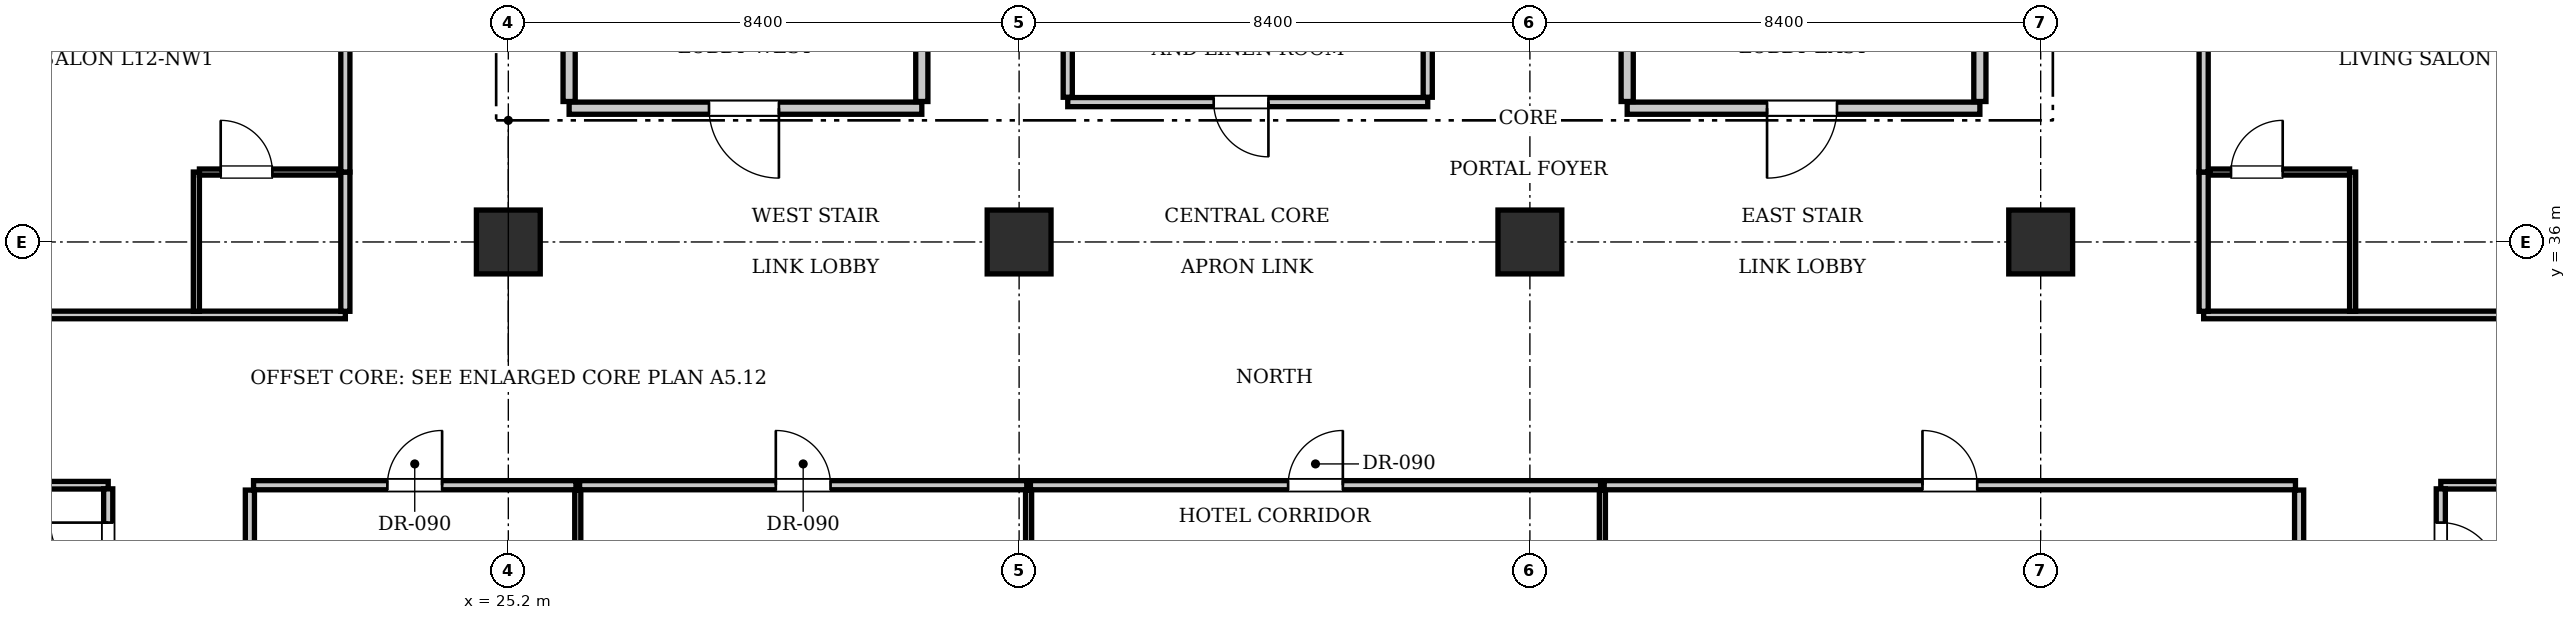
"""IFC4 building model, lengths in metres.
Left out: names, types, materials, properties, quantities, classifications, styles, units other than length and angle.
Written with IfcOpenShell. Run it as: python <this file> out.ifc"""

import sys

from ifc_helpers import new_model, si_unit, direction, frame, frame_2d, origin, origin_2d, place, context, subcontext, project, spatial, rectangle, extrude, element, fill, save


model = new_model("IFC4")
c1 = context("Model", 3, precision=1e-05, world=origin(), true_north=direction((0.0, 1.0)))
c2 = subcontext(c1, "Body", "Model", "MODEL_VIEW")
j1 = project(units=[si_unit("LENGTHUNIT", "METRE"), si_unit("PLANEANGLEUNIT", "RADIAN")], contexts=[c1])
p1 = place(None, origin())
s1 = spatial("IfcSite", under=j1, at=p1, CompositionType="ELEMENT")
p2 = place(p1, origin())
s2 = spatial("IfcBuilding", under=s1, at=p2, CompositionType="ELEMENT")
p3 = place(p2, frame((0.0, 0.0, 53.9)))
s3 = spatial("IfcBuildingStorey", under=s2, at=p3, CompositionType="ELEMENT", Elevation=53.9)
for number, where, z_axis, x_axis in (
    (1, (25.2, 36.0, 0.0), (0.0, 0.0, 1.0), (1.0, 0.0, 0.0)),
    (2, (33.6, 36.0, 0.0), (0.0, 0.0, 1.0), (1.0, 0.0, 0.0)),
    (3, (42.0, 36.0, 0.0), (0.0, 0.0, 1.0), (1.0, 0.0, 0.0)),
    (4, (50.4, 36.0, 0.0), (0.0, 0.0, 1.0), (1.0, 0.0, 0.0)),
):
    element("IfcColumn", number, at=place(p3, frame(where, z_axis=z_axis, x_axis=x_axis)), inside=s3, PredefinedType="COLUMN", context=c2, shape_type="SweptSolid", body=[
        extrude(rectangle(XDim=1.05, YDim=1.05, at=origin_2d()), origin(), (0.0, 0.0, 1.0), 3.85),
    ])
p4 = place(p3, frame((26.2, 38.2, 0.0), z_axis=(0.0, 0.0, 1.0), x_axis=(1.0, 0.0, 0.0)))
e5 = element("IfcWall", 5, at=p4, inside=s3, PredefinedType="PARTITIONING", context=c2, shape_type="SweptSolid", body=[
    extrude(rectangle(XDim=5.8, YDim=0.2, at=frame_2d((2.9, 0.0))), origin(), (0.0, 0.0, 1.0), 3.61),
])
p5 = place(p4, frame((2.3, 0.0, 0.0)))
e6 = element("IfcOpeningElement", 6, at=p5, cuts=e5, PredefinedType="OPENING", context=c2, shape_type="SweptSolid", body=[
    extrude(rectangle(XDim=1.15, YDim=2.15, at=frame_2d((0.575, 1.075))), frame((0.0, 0.11, 0.0), z_axis=(0.0, -1.0, 0.0), x_axis=(1.0, 0.0, 0.0)), (0.0, 0.0, 1.0), 0.22),
])
for number, where, z_axis, x_axis in (
    (7, (26.2, 38.31, 0.0), (0.0, 0.0, 1.0), (0.0, 1.0, 0.0)),
    (8, (32.0, 38.31, 0.0), (0.0, 0.0, 1.0), (0.0, 1.0, 0.0)),
):
    element("IfcWall", number, at=place(p3, frame(where, z_axis=z_axis, x_axis=x_axis)), inside=s3, PredefinedType="PARTITIONING", context=c2, shape_type="SweptSolid", body=[
        extrude(rectangle(XDim=3.07, YDim=0.2, at=frame_2d((1.535, 0.0))), origin(), (0.0, 0.0, 1.0), 3.61),
    ])
p6 = place(p3, frame((43.6, 38.2, 0.0), z_axis=(0.0, 0.0, 1.0), x_axis=(1.0, 0.0, 0.0)))
e9 = element("IfcWall", 9, at=p6, inside=s3, PredefinedType="PARTITIONING", context=c2, shape_type="SweptSolid", body=[
    extrude(rectangle(XDim=5.8, YDim=0.2, at=frame_2d((2.9, 0.0))), origin(), (0.0, 0.0, 1.0), 3.61),
])
p7 = place(p6, frame((2.3, 0.0, 0.0)))
e10 = element("IfcOpeningElement", 10, at=p7, cuts=e9, PredefinedType="OPENING", context=c2, shape_type="SweptSolid", body=[
    extrude(rectangle(XDim=1.15, YDim=2.15, at=frame_2d((0.575, 1.075))), frame((0.0, 0.11, 0.0), z_axis=(0.0, -1.0, 0.0), x_axis=(1.0, 0.0, 0.0)), (0.0, 0.0, 1.0), 0.22),
])
for number, where, z_axis, x_axis in (
    (11, (43.6, 38.31, 0.0), (0.0, 0.0, 1.0), (0.0, 1.0, 0.0)),
    (12, (49.4, 38.31, 0.0), (0.0, 0.0, 1.0), (0.0, 1.0, 0.0)),
):
    element("IfcWall", number, at=place(p3, frame(where, z_axis=z_axis, x_axis=x_axis)), inside=s3, PredefinedType="PARTITIONING", context=c2, shape_type="SweptSolid", body=[
        extrude(rectangle(XDim=3.07, YDim=0.2, at=frame_2d((1.535, 0.0))), origin(), (0.0, 0.0, 1.0), 3.61),
    ])
p8 = place(p3, frame((34.4, 38.3, 0.0), z_axis=(0.0, 0.0, 1.0), x_axis=(1.0, 0.0, 0.0)))
e13 = element("IfcWall", 13, at=p8, inside=s3, PredefinedType="PARTITIONING", context=c2, shape_type="SweptSolid", body=[
    extrude(rectangle(XDim=5.92, YDim=0.15, at=frame_2d((2.96, 0.0))), origin(), (0.0, 0.0, 1.0), 3.61),
])
p9 = place(p8, frame((2.4, 0.0, 0.0)))
e14 = element("IfcOpeningElement", 14, at=p9, cuts=e13, PredefinedType="OPENING", context=c2, shape_type="SweptSolid", body=[
    extrude(rectangle(XDim=0.9, YDim=2.1, at=frame_2d((0.45, 1.05))), frame((0.0, 0.085, 0.0), z_axis=(0.0, -1.0, 0.0), x_axis=(1.0, 0.0, 0.0)), (0.0, 0.0, 1.0), 0.17),
])
for number, where, z_axis, x_axis in (
    (15, (34.4, 38.38, 0.0), (0.0, 0.0, 1.0), (0.0, 1.0, 0.0)),
    (16, (40.32, 38.38, 0.0), (0.0, 0.0, 1.0), (0.0, 1.0, 0.0)),
):
    element("IfcWall", number, at=place(p3, frame(where, z_axis=z_axis, x_axis=x_axis)), inside=s3, PredefinedType="PARTITIONING", context=c2, shape_type="SweptSolid", body=[
        extrude(rectangle(XDim=2.84, YDim=0.15, at=frame_2d((1.42, 0.0))), origin(), (0.0, 0.0, 1.0), 3.61),
    ])
p10 = place(p3, frame((20.95, 23.98, 0.0), z_axis=(0.0, 0.0, 1.0), x_axis=(0.0, 1.0, 0.0)))
e17 = element("IfcWall", 17, at=p10, inside=s3, PredefinedType="PARTITIONING", context=c2, shape_type="SweptSolid", body=[
    extrude(rectangle(XDim=7.94, YDim=0.15, at=frame_2d((3.97, 0.0))), origin(), (0.0, 0.0, 1.0), 3.207),
])
p11 = place(p3, frame((54.65, 23.98, 0.0), z_axis=(0.0, 0.0, 1.0), x_axis=(0.0, 1.0, 0.0)))
e18 = element("IfcWall", 18, at=p11, inside=s3, PredefinedType="PARTITIONING", context=c2, shape_type="SweptSolid", body=[
    extrude(rectangle(XDim=7.94, YDim=0.15, at=frame_2d((3.97, 0.0))), origin(), (0.0, 0.0, 1.0), 3.255),
])
p12 = place(p3, frame((21.01, 32.0, 0.0), z_axis=(0.0, 0.0, 1.0), x_axis=(1.0, 0.0, 0.0)))
e19 = element("IfcWall", 19, at=p12, inside=s3, PredefinedType="PARTITIONING", context=c2, shape_type="SweptSolid", body=[
    extrude(rectangle(XDim=5.302, YDim=0.15, at=frame_2d((2.651, 0.0))), origin(), (0.0, 0.0, 1.0), 3.61),
])
p13 = place(p12, frame((2.201, 0.0, 0.0)))
e20 = element("IfcOpeningElement", 20, at=p13, cuts=e19, PredefinedType="OPENING", context=c2, shape_type="SweptSolid", body=[
    extrude(rectangle(XDim=0.9, YDim=2.1, at=frame_2d((0.45, 1.05))), frame((0.0, 0.085, 0.0), z_axis=(0.0, -1.0, 0.0), x_axis=(1.0, 0.0, 0.0)), (0.0, 0.0, 1.0), 0.17),
])
p14 = place(p3, frame((26.342, 23.98, 0.0), z_axis=(0.0, 0.0, 1.0), x_axis=(0.0, 1.0, 0.0)))
e21 = element("IfcWall", 21, at=p14, inside=s3, PredefinedType="PARTITIONING", context=c2, shape_type="SweptSolid", body=[
    extrude(rectangle(XDim=7.94, YDim=0.1, at=frame_2d((3.97, 0.0))), origin(), (0.0, 0.0, 1.0), 3.61),
])
p15 = place(p3, frame((26.372, 32.0, 0.0), z_axis=(0.0, 0.0, 1.0), x_axis=(1.0, 0.0, 0.0)))
e22 = element("IfcWall", 22, at=p15, inside=s3, PredefinedType="PARTITIONING", context=c2, shape_type="SweptSolid", body=[
    extrude(rectangle(XDim=7.354, YDim=0.15, at=frame_2d((3.677, 0.0))), origin(), (0.0, 0.0, 1.0), 3.61),
])
p16 = place(p15, frame((3.227, 0.0, 0.0)))
e23 = element("IfcOpeningElement", 23, at=p16, cuts=e22, PredefinedType="OPENING", context=c2, shape_type="SweptSolid", body=[
    extrude(rectangle(XDim=0.9, YDim=2.1, at=frame_2d((0.45, 1.05))), frame((0.0, 0.085, 0.0), z_axis=(0.0, -1.0, 0.0), x_axis=(1.0, 0.0, 0.0)), (0.0, 0.0, 1.0), 0.17),
])
p17 = place(p3, frame((33.756, 23.98, 0.0), z_axis=(0.0, 0.0, 1.0), x_axis=(0.0, 1.0, 0.0)))
e24 = element("IfcWall", 24, at=p17, inside=s3, PredefinedType="PARTITIONING", context=c2, shape_type="SweptSolid", body=[
    extrude(rectangle(XDim=7.94, YDim=0.1, at=frame_2d((3.97, 0.0))), origin(), (0.0, 0.0, 1.0), 2.988),
])
p18 = place(p3, frame((33.786, 32.0, 0.0), z_axis=(0.0, 0.0, 1.0), x_axis=(1.0, 0.0, 0.0)))
e25 = element("IfcWall", 25, at=p18, inside=s3, PredefinedType="PARTITIONING", context=c2, shape_type="SweptSolid", body=[
    extrude(rectangle(XDim=9.376, YDim=0.15, at=frame_2d((4.688, 0.0))), origin(), (0.0, 0.0, 1.0), 3.61),
])
p19 = place(p18, frame((4.238, 0.0, 0.0)))
e26 = element("IfcOpeningElement", 26, at=p19, cuts=e25, PredefinedType="OPENING", context=c2, shape_type="SweptSolid", body=[
    extrude(rectangle(XDim=0.9, YDim=2.1, at=frame_2d((0.45, 1.05))), frame((0.0, 0.085, 0.0), z_axis=(0.0, -1.0, 0.0), x_axis=(1.0, 0.0, 0.0)), (0.0, 0.0, 1.0), 0.17),
])
p20 = place(p3, frame((43.192, 23.98, 0.0), z_axis=(0.0, 0.0, 1.0), x_axis=(0.0, 1.0, 0.0)))
e27 = element("IfcWall", 27, at=p20, inside=s3, PredefinedType="PARTITIONING", context=c2, shape_type="SweptSolid", body=[
    extrude(rectangle(XDim=7.94, YDim=0.1, at=frame_2d((3.97, 0.0))), origin(), (0.0, 0.0, 1.0), 3.61),
])
p21 = place(p3, frame((43.222, 32.0, 0.0), z_axis=(0.0, 0.0, 1.0), x_axis=(1.0, 0.0, 0.0)))
e28 = element("IfcWall", 28, at=p21, inside=s3, PredefinedType="PARTITIONING", context=c2, shape_type="SweptSolid", body=[
    extrude(rectangle(XDim=11.368, YDim=0.15, at=frame_2d((5.684, 0.0))), origin(), (0.0, 0.0, 1.0), 3.61),
])
p22 = place(p21, frame((5.234, 0.0, 0.0)))
e29 = element("IfcOpeningElement", 29, at=p22, cuts=e28, PredefinedType="OPENING", context=c2, shape_type="SweptSolid", body=[
    extrude(rectangle(XDim=0.9, YDim=2.1, at=frame_2d((0.45, 1.05))), frame((0.0, 0.085, 0.0), z_axis=(0.0, -1.0, 0.0), x_axis=(1.0, 0.0, 0.0)), (0.0, 0.0, 1.0), 0.17),
])
p23 = place(p3, frame((10.9, 32.0, 0.0), z_axis=(0.0, 0.0, 1.0), x_axis=(1.0, 0.0, 0.0)))
e30 = element("IfcWall", 30, at=p23, inside=s3, PredefinedType="PARTITIONING", context=c2, shape_type="SweptSolid", body=[
    extrude(rectangle(XDim=7.72, YDim=0.125, at=frame_2d((3.86, 0.0))), origin(), (0.0, 0.0, 1.0), 3.61),
])
p24 = place(p3, frame((56.98, 32.0, 0.0), z_axis=(0.0, 0.0, 1.0), x_axis=(1.0, 0.0, 0.0)))
e31 = element("IfcWall", 31, at=p24, inside=s3, PredefinedType="PARTITIONING", context=c2, shape_type="SweptSolid", body=[
    extrude(rectangle(XDim=7.72, YDim=0.125, at=frame_2d((3.86, 0.0))), origin(), (0.0, 0.0, 1.0), 3.61),
])
p25 = place(p3, frame((18.62, 29.88, 0.0), z_axis=(0.0, 0.0, 1.0), x_axis=(0.0, 1.0, 0.0)))
e32 = element("IfcWall", 32, at=p25, inside=s3, PredefinedType="PARTITIONING", context=c2, shape_type="SweptSolid", body=[
    extrude(rectangle(XDim=2.06, YDim=0.15, at=frame_2d((1.03, 0.0))), origin(), (0.0, 0.0, 1.0), 3.61),
])
p26 = place(p25, frame((0.555, 0.0, 0.0)))
e33 = element("IfcOpeningElement", 33, at=p26, cuts=e32, PredefinedType="OPENING", context=c2, shape_type="SweptSolid", body=[
    extrude(rectangle(XDim=0.95, YDim=2.15, at=frame_2d((0.475, 1.075))), frame((0.0, 0.085, 0.0), z_axis=(0.0, -1.0, 0.0), x_axis=(1.0, 0.0, 0.0)), (0.0, 0.0, 1.0), 0.17),
])
p27 = place(p3, frame((56.98, 29.88, 0.0), z_axis=(0.0, 0.0, 1.0), x_axis=(0.0, 1.0, 0.0)))
e34 = element("IfcWall", 34, at=p27, inside=s3, PredefinedType="PARTITIONING", context=c2, shape_type="SweptSolid", body=[
    extrude(rectangle(XDim=2.06, YDim=0.15, at=frame_2d((1.03, 0.0))), origin(), (0.0, 0.0, 1.0), 3.61),
])
p28 = place(p27, frame((0.555, 0.0, 0.0)))
e35 = element("IfcOpeningElement", 35, at=p28, cuts=e34, PredefinedType="OPENING", context=c2, shape_type="SweptSolid", body=[
    extrude(rectangle(XDim=0.95, YDim=2.15, at=frame_2d((0.475, 1.075))), frame((0.0, 0.085, 0.0), z_axis=(0.0, -1.0, 0.0), x_axis=(1.0, 0.0, 0.0)), (0.0, 0.0, 1.0), 0.17),
])
p29 = place(p3, frame((10.9, 34.8, 0.0), z_axis=(0.0, 0.0, 1.0), x_axis=(1.0, 0.0, 0.0)))
e36 = element("IfcWall", 36, at=p29, inside=s3, PredefinedType="PARTITIONING", context=c2, shape_type="SweptSolid", body=[
    extrude(rectangle(XDim=11.62, YDim=0.125, at=frame_2d((5.81, 0.0))), origin(), (0.0, 0.0, 1.0), 3.61),
])
p30 = place(p3, frame((53.08, 34.8, 0.0), z_axis=(0.0, 0.0, 1.0), x_axis=(1.0, 0.0, 0.0)))
e37 = element("IfcWall", 37, at=p30, inside=s3, PredefinedType="PARTITIONING", context=c2, shape_type="SweptSolid", body=[
    extrude(rectangle(XDim=11.62, YDim=0.125, at=frame_2d((5.81, 0.0))), origin(), (0.0, 0.0, 1.0), 3.61),
])
p31 = place(p3, frame((22.52, 34.86, 0.0), z_axis=(0.0, 0.0, 1.0), x_axis=(0.0, 1.0, 0.0)))
e38 = element("IfcWall", 38, at=p31, inside=s3, PredefinedType="PARTITIONING", context=c2, shape_type="SweptSolid", body=[
    extrude(rectangle(XDim=2.29, YDim=0.15, at=frame_2d((1.145, 0.0))), origin(), (0.0, 0.0, 1.0), 3.61),
])
p32 = place(p3, frame((22.52, 37.15, 0.0), z_axis=(0.0, 0.0, 1.0), x_axis=(0.0, 1.0, 0.0)))
e39 = element("IfcWall", 39, at=p32, inside=s3, PredefinedType="PARTITIONING", context=c2, shape_type="SweptSolid", body=[
    extrude(rectangle(XDim=5.359, YDim=0.15, at=frame_2d((2.679, 0.0))), origin(), (0.0, 0.0, 1.0), 3.61),
])
p33 = place(p32, frame((2.204, 0.0, 0.0)))
e40 = element("IfcOpeningElement", 40, at=p33, cuts=e39, PredefinedType="OPENING", context=c2, shape_type="SweptSolid", body=[
    extrude(rectangle(XDim=0.95, YDim=2.15, at=frame_2d((0.475, 1.075))), frame((0.0, 0.085, 0.0), z_axis=(0.0, -1.0, 0.0), x_axis=(1.0, 0.0, 0.0)), (0.0, 0.0, 1.0), 0.17),
])
p34 = place(p3, frame((20.07, 34.86, 0.0), z_axis=(0.0, 0.0, 1.0), x_axis=(0.0, 1.0, 0.0)))
e41 = element("IfcWall", 41, at=p34, inside=s3, PredefinedType="PARTITIONING", context=c2, shape_type="SweptSolid", body=[
    extrude(rectangle(XDim=2.29, YDim=0.1, at=frame_2d((1.145, 0.0))), origin(), (0.0, 0.0, 1.0), 3.61),
])
p35 = place(p3, frame((20.12, 37.15, 0.0), z_axis=(0.0, 0.0, 1.0), x_axis=(1.0, 0.0, 0.0)))
e42 = element("IfcWall", 42, at=p35, inside=s3, PredefinedType="PARTITIONING", context=c2, shape_type="SweptSolid", body=[
    extrude(rectangle(XDim=2.3, YDim=0.1, at=frame_2d((1.15, 0.0))), origin(), (0.0, 0.0, 1.0), 3.61),
])
p36 = place(p35, frame((0.35, 0.0, 0.0)))
e43 = element("IfcOpeningElement", 43, at=p36, cuts=e42, PredefinedType="OPENING", context=c2, shape_type="SweptSolid", body=[
    extrude(rectangle(XDim=0.85, YDim=2.1, at=frame_2d((0.425, 1.05))), frame((0.0, 0.06, 0.0), z_axis=(0.0, -1.0, 0.0), x_axis=(1.0, 0.0, 0.0)), (0.0, 0.0, 1.0), 0.12),
])
p37 = place(p3, frame((53.08, 34.86, 0.0), z_axis=(0.0, 0.0, 1.0), x_axis=(0.0, 1.0, 0.0)))
e44 = element("IfcWall", 44, at=p37, inside=s3, PredefinedType="PARTITIONING", context=c2, shape_type="SweptSolid", body=[
    extrude(rectangle(XDim=2.29, YDim=0.15, at=frame_2d((1.145, 0.0))), origin(), (0.0, 0.0, 1.0), 3.61),
])
p38 = place(p3, frame((53.08, 37.15, 0.0), z_axis=(0.0, 0.0, 1.0), x_axis=(0.0, 1.0, 0.0)))
e45 = element("IfcWall", 45, at=p38, inside=s3, PredefinedType="PARTITIONING", context=c2, shape_type="SweptSolid", body=[
    extrude(rectangle(XDim=5.359, YDim=0.15, at=frame_2d((2.679, 0.0))), origin(), (0.0, 0.0, 1.0), 3.61),
])
p39 = place(p38, frame((2.204, 0.0, 0.0)))
e46 = element("IfcOpeningElement", 46, at=p39, cuts=e45, PredefinedType="OPENING", context=c2, shape_type="SweptSolid", body=[
    extrude(rectangle(XDim=0.95, YDim=2.15, at=frame_2d((0.475, 1.075))), frame((0.0, 0.085, 0.0), z_axis=(0.0, -1.0, 0.0), x_axis=(1.0, 0.0, 0.0)), (0.0, 0.0, 1.0), 0.17),
])
p40 = place(p3, frame((55.53, 34.86, 0.0), z_axis=(0.0, 0.0, 1.0), x_axis=(0.0, 1.0, 0.0)))
e47 = element("IfcWall", 47, at=p40, inside=s3, PredefinedType="PARTITIONING", context=c2, shape_type="SweptSolid", body=[
    extrude(rectangle(XDim=2.29, YDim=0.1, at=frame_2d((1.145, 0.0))), origin(), (0.0, 0.0, 1.0), 3.61),
])
p41 = place(p3, frame((53.18, 37.15, 0.0), z_axis=(0.0, 0.0, 1.0), x_axis=(1.0, 0.0, 0.0)))
e48 = element("IfcWall", 48, at=p41, inside=s3, PredefinedType="PARTITIONING", context=c2, shape_type="SweptSolid", body=[
    extrude(rectangle(XDim=2.3, YDim=0.1, at=frame_2d((1.15, 0.0))), origin(), (0.0, 0.0, 1.0), 3.61),
])
p42 = place(p41, frame((0.35, 0.0, 0.0)))
e49 = element("IfcOpeningElement", 49, at=p42, cuts=e48, PredefinedType="OPENING", context=c2, shape_type="SweptSolid", body=[
    extrude(rectangle(XDim=0.85, YDim=2.1, at=frame_2d((0.425, 1.05))), frame((0.0, 0.06, 0.0), z_axis=(0.0, -1.0, 0.0), x_axis=(1.0, 0.0, 0.0)), (0.0, 0.0, 1.0), 0.12),
])
p43 = place(p5, frame((1.15, 0.0, 0.0), z_axis=(0.0, 0.0, 1.0), x_axis=(-1.0, 0.0, 0.0)))
e50 = element("IfcDoor", 50, at=p43, inside=s3, OperationType="SINGLE_SWING_LEFT", PredefinedType="DOOR", context=c2, shape_type="SweptSolid", body=[
    extrude(rectangle(XDim=1.15, YDim=2.15, at=frame_2d((0.575, 1.075))), frame((0.0, 0.025, 0.0), z_axis=(0.0, -1.0, 0.0), x_axis=(1.0, 0.0, 0.0)), (0.0, 0.0, 1.0), 0.05),
])
fill(e6, e50)
p44 = place(p7, frame((1.15, 0.0, 0.0), z_axis=(0.0, 0.0, 1.0), x_axis=(-1.0, 0.0, 0.0)))
e51 = element("IfcDoor", 51, at=p44, inside=s3, OperationType="SINGLE_SWING_RIGHT", PredefinedType="DOOR", context=c2, shape_type="SweptSolid", body=[
    extrude(rectangle(XDim=1.15, YDim=2.15, at=frame_2d((0.575, 1.075))), frame((0.0, 0.025, 0.0), z_axis=(0.0, -1.0, 0.0), x_axis=(1.0, 0.0, 0.0)), (0.0, 0.0, 1.0), 0.05),
])
fill(e10, e51)
p45 = place(p9, frame((0.9, 0.0, 0.0), z_axis=(0.0, 0.0, 1.0), x_axis=(-1.0, 0.0, 0.0)))
e52 = element("IfcDoor", 52, at=p45, inside=s3, OperationType="SINGLE_SWING_LEFT", PredefinedType="DOOR", context=c2, shape_type="SweptSolid", body=[
    extrude(rectangle(XDim=0.9, YDim=2.1, at=frame_2d((0.45, 1.05))), frame((0.0, 0.025, 0.0), z_axis=(0.0, -1.0, 0.0), x_axis=(1.0, 0.0, 0.0)), (0.0, 0.0, 1.0), 0.05),
])
fill(e14, e52)
p46 = place(p13, origin())
e53 = element("IfcDoor", 53, at=p46, inside=s3, OperationType="SINGLE_SWING_RIGHT", PredefinedType="DOOR", context=c2, shape_type="SweptSolid", body=[
    extrude(rectangle(XDim=0.9, YDim=2.1, at=frame_2d((0.45, 1.05))), frame((0.0, 0.025, 0.0), z_axis=(0.0, -1.0, 0.0), x_axis=(1.0, 0.0, 0.0)), (0.0, 0.0, 1.0), 0.05),
])
fill(e20, e53)
p47 = place(p16, origin())
e54 = element("IfcDoor", 54, at=p47, inside=s3, OperationType="SINGLE_SWING_LEFT", PredefinedType="DOOR", context=c2, shape_type="SweptSolid", body=[
    extrude(rectangle(XDim=0.9, YDim=2.1, at=frame_2d((0.45, 1.05))), frame((0.0, 0.025, 0.0), z_axis=(0.0, -1.0, 0.0), x_axis=(1.0, 0.0, 0.0)), (0.0, 0.0, 1.0), 0.05),
])
fill(e23, e54)
p48 = place(p19, origin())
e55 = element("IfcDoor", 55, at=p48, inside=s3, OperationType="SINGLE_SWING_RIGHT", PredefinedType="DOOR", context=c2, shape_type="SweptSolid", body=[
    extrude(rectangle(XDim=0.9, YDim=2.1, at=frame_2d((0.45, 1.05))), frame((0.0, 0.025, 0.0), z_axis=(0.0, -1.0, 0.0), x_axis=(1.0, 0.0, 0.0)), (0.0, 0.0, 1.0), 0.05),
])
fill(e26, e55)
p49 = place(p22, origin())
e56 = element("IfcDoor", 56, at=p49, inside=s3, OperationType="SINGLE_SWING_LEFT", PredefinedType="DOOR", context=c2, shape_type="SweptSolid", body=[
    extrude(rectangle(XDim=0.9, YDim=2.1, at=frame_2d((0.45, 1.05))), frame((0.0, 0.025, 0.0), z_axis=(0.0, -1.0, 0.0), x_axis=(1.0, 0.0, 0.0)), (0.0, 0.0, 1.0), 0.05),
])
fill(e29, e56)
p50 = place(p26, origin())
e57 = element("IfcDoor", 57, at=p50, inside=s3, OperationType="SINGLE_SWING_RIGHT", PredefinedType="DOOR", context=c2, shape_type="SweptSolid", body=[
    extrude(rectangle(XDim=0.95, YDim=2.15, at=frame_2d((0.475, 1.075))), frame((0.0, 0.025, 0.0), z_axis=(0.0, -1.0, 0.0), x_axis=(1.0, 0.0, 0.0)), (0.0, 0.0, 1.0), 0.05),
])
fill(e33, e57)
p51 = place(p28, frame((0.95, 0.0, 0.0), z_axis=(0.0, 0.0, 1.0), x_axis=(-1.0, 0.0, 0.0)))
e58 = element("IfcDoor", 58, at=p51, inside=s3, OperationType="SINGLE_SWING_RIGHT", PredefinedType="DOOR", context=c2, shape_type="SweptSolid", body=[
    extrude(rectangle(XDim=0.95, YDim=2.15, at=frame_2d((0.475, 1.075))), frame((0.0, 0.025, 0.0), z_axis=(0.0, -1.0, 0.0), x_axis=(1.0, 0.0, 0.0)), (0.0, 0.0, 1.0), 0.05),
])
fill(e35, e58)
p52 = place(p36, origin())
e59 = element("IfcDoor", 59, at=p52, inside=s3, OperationType="SINGLE_SWING_LEFT", PredefinedType="DOOR", context=c2, shape_type="SweptSolid", body=[
    extrude(rectangle(XDim=0.85, YDim=2.1, at=frame_2d((0.425, 1.05))), frame((0.0, 0.025, 0.0), z_axis=(0.0, -1.0, 0.0), x_axis=(1.0, 0.0, 0.0)), (0.0, 0.0, 1.0), 0.05),
])
fill(e43, e59)
p53 = place(p42, origin())
e60 = element("IfcDoor", 60, at=p53, inside=s3, OperationType="SINGLE_SWING_RIGHT", PredefinedType="DOOR", context=c2, shape_type="SweptSolid", body=[
    extrude(rectangle(XDim=0.85, YDim=2.1, at=frame_2d((0.425, 1.05))), frame((0.0, 0.025, 0.0), z_axis=(0.0, -1.0, 0.0), x_axis=(1.0, 0.0, 0.0)), (0.0, 0.0, 1.0), 0.05),
])
fill(e49, e60)
save(model, sys.argv[1])
